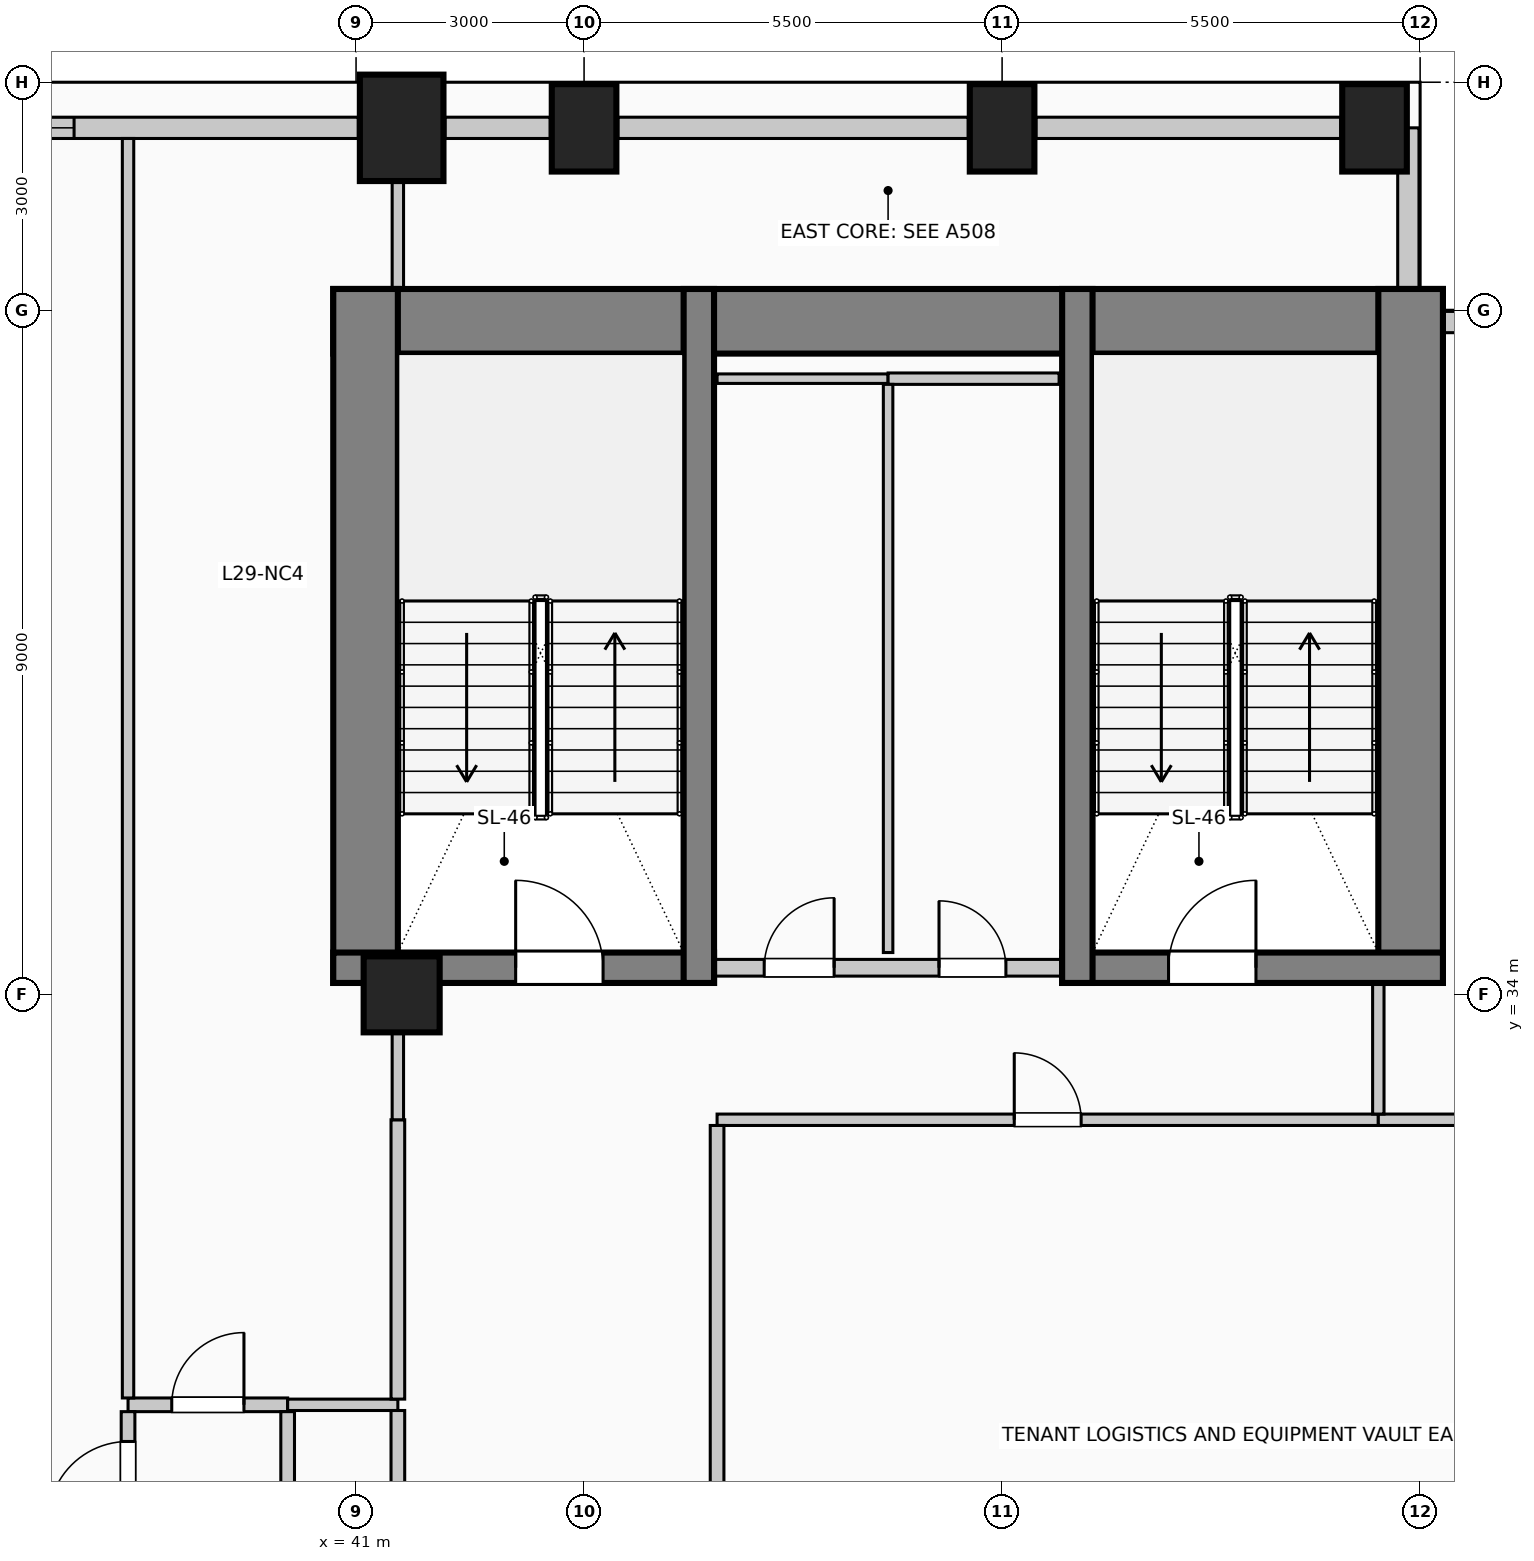
"""IFC4 building model, lengths in metres.
Left out: names, types, materials, properties, quantities, classifications, styles, units other than length and angle.
Written with IfcOpenShell. Run it as: python <this file> out.ifc"""

import sys

from ifc_helpers import new_model, si_unit, direction, frame, frame_2d, origin, origin_2d, place, context, subcontext, project, spatial, rectangle, circle, extrude, element, fill, save


model = new_model("IFC4")
c1 = context("Model", 3, precision=1e-05, world=origin(), true_north=direction((0.0, 1.0)))
c2 = subcontext(c1, "Body", "Model", "MODEL_VIEW")
j1 = project(units=[si_unit("LENGTHUNIT", "METRE"), si_unit("PLANEANGLEUNIT", "RADIAN")], contexts=[c1])
p1 = place(None, origin())
s1 = spatial("IfcSite", under=j1, at=p1, CompositionType="ELEMENT")
p2 = place(p1, origin())
s2 = spatial("IfcBuilding", under=s1, at=p2, CompositionType="ELEMENT")
p3 = place(p2, frame((0.0, 0.0, 120.6)))
s3 = spatial("IfcBuildingStorey", under=s2, at=p3, CompositionType="ELEMENT", Elevation=120.6)
p4 = place(p3, frame((40.7, 42.855, 0.0), z_axis=(0.0, 0.0, 1.0), x_axis=(1.0, 0.0, 0.0)))
e1 = element("IfcWall", 1, at=p4, inside=s3, PredefinedType="SHEAR", context=c2, shape_type="SweptSolid", body=[
    extrude(rectangle(XDim=14.6, YDim=0.85, at=frame_2d((7.3, 0.0))), origin(), (0.0, 0.0, 1.0), 4.0),
])
for number, where, z_axis, x_axis in (
    (2, (41.125, 34.15, 0.0), (0.0, 0.0, 1.0), (0.0, 1.0, 0.0)),
    (3, (54.875, 34.15, 0.0), (0.0, 0.0, 1.0), (0.0, 1.0, 0.0)),
):
    element("IfcWall", number, at=place(p3, frame(where, z_axis=z_axis, x_axis=x_axis)), inside=s3, PredefinedType="SHEAR", context=c2, shape_type="SweptSolid", body=[
        extrude(rectangle(XDim=9.13, YDim=0.85, at=frame_2d((4.565, 0.0))), origin(), (0.0, 0.0, 1.0), 4.0),
    ])
p5 = place(p3, frame((40.7, 34.35, 0.0), z_axis=(0.0, 0.0, 1.0), x_axis=(1.0, 0.0, 0.0)))
e4 = element("IfcWall", 4, at=p5, inside=s3, PredefinedType="SHEAR", context=c2, shape_type="SweptSolid", body=[
    extrude(rectangle(XDim=5.01, YDim=0.4, at=frame_2d((2.505, 0.0))), origin(), (0.0, 0.0, 1.0), 4.0),
])
p6 = place(p5, frame((2.4, 0.0, 0.0)))
e5 = element("IfcOpeningElement", 5, at=p6, cuts=e4, PredefinedType="OPENING", context=c2, shape_type="SweptSolid", body=[
    extrude(rectangle(XDim=1.15, YDim=2.2, at=frame_2d((0.575, 1.1))), frame((0.0, 0.21, 0.0), z_axis=(0.0, -1.0, 0.0), x_axis=(1.0, 0.0, 0.0)), (0.0, 0.0, 1.0), 0.42),
])
p7 = place(p3, frame((45.51, 34.15, 0.0), z_axis=(0.0, 0.0, 1.0), x_axis=(0.0, 1.0, 0.0)))
e6 = element("IfcWall", 6, at=p7, inside=s3, PredefinedType="SHEAR", context=c2, shape_type="SweptSolid", body=[
    extrude(rectangle(XDim=9.13, YDim=0.4, at=frame_2d((4.565, 0.0))), origin(), (0.0, 0.0, 1.0), 4.0),
])
p8 = place(p3, frame((50.29, 34.35, 0.0), z_axis=(0.0, 0.0, 1.0), x_axis=(1.0, 0.0, 0.0)))
e7 = element("IfcWall", 7, at=p8, inside=s3, PredefinedType="SHEAR", context=c2, shape_type="SweptSolid", body=[
    extrude(rectangle(XDim=5.01, YDim=0.4, at=frame_2d((2.505, 0.0))), origin(), (0.0, 0.0, 1.0), 4.0),
])
p9 = place(p8, frame((1.4, 0.0, 0.0)))
e8 = element("IfcOpeningElement", 8, at=p9, cuts=e7, PredefinedType="OPENING", context=c2, shape_type="SweptSolid", body=[
    extrude(rectangle(XDim=1.15, YDim=2.2, at=frame_2d((0.575, 1.1))), frame((0.0, 0.21, 0.0), z_axis=(0.0, -1.0, 0.0), x_axis=(1.0, 0.0, 0.0)), (0.0, 0.0, 1.0), 0.42),
])
p10 = place(p3, frame((50.49, 34.15, 0.0), z_axis=(0.0, 0.0, 1.0), x_axis=(0.0, 1.0, 0.0)))
e9 = element("IfcWall", 9, at=p10, inside=s3, PredefinedType="SHEAR", context=c2, shape_type="SweptSolid", body=[
    extrude(rectangle(XDim=9.13, YDim=0.4, at=frame_2d((4.565, 0.0))), origin(), (0.0, 0.0, 1.0), 4.0),
])
p11 = place(p3, frame((41.6, 45.4, 0.0), z_axis=(0.0, 0.0, 1.0), x_axis=(1.0, 0.0, 0.0)))
e10 = element("IfcColumn", 10, at=p11, inside=s3, PredefinedType="COLUMN", context=c2, shape_type="SweptSolid", body=[
    extrude(rectangle(XDim=1.1, YDim=1.4, at=origin_2d()), origin(), (0.0, 0.0, 1.0), 4.0),
])
for number, where, z_axis, x_axis in (
    (11, (44.0, 45.4, 0.0), (0.0, 0.0, 1.0), (1.0, 0.0, 0.0)),
    (12, (49.5, 45.4, 0.0), (0.0, 0.0, 1.0), (1.0, 0.0, 0.0)),
    (13, (54.4, 45.4, 0.0), (0.0, 0.0, 1.0), (1.0, 0.0, 0.0)),
):
    element("IfcColumn", number, at=place(p3, frame(where, z_axis=z_axis, x_axis=x_axis)), inside=s3, PredefinedType="COLUMN", context=c2, shape_type="SweptSolid", body=[
        extrude(rectangle(XDim=0.85, YDim=1.15, at=origin_2d()), origin(), (0.0, 0.0, 1.0), 4.0),
    ])
p12 = place(p3, frame((41.6, 34.0, 0.0), z_axis=(0.0, 0.0, 1.0), x_axis=(1.0, 0.0, 0.0)))
e14 = element("IfcColumn", 14, at=p12, inside=s3, PredefinedType="COLUMN", context=c2, shape_type="SweptSolid", body=[
    extrude(circle(Radius=0.5, at=origin_2d()), origin(), (0.0, 0.0, 1.0), 4.0),
])
p13 = place(p3, frame((34.57, 45.4, 0.0), z_axis=(0.0, 0.0, 1.0), x_axis=(1.0, 0.0, 0.0)))
e15 = element("IfcWall", 15, at=p13, inside=s3, PredefinedType="SOLIDWALL", context=c2, shape_type="SweptSolid", body=[
    extrude(rectangle(XDim=6.46, YDim=0.28, at=frame_2d((3.23, 0.0))), origin(), (0.0, 0.0, 1.0), 2.875),
])
p14 = place(p13, frame((1.02, 0.0, 0.5)))
e16 = element("IfcOpeningElement", 16, at=p14, cuts=e15, PredefinedType="OPENING", context=c2, shape_type="SweptSolid", body=[
    extrude(rectangle(XDim=1.7, YDim=1.95, at=frame_2d((0.85, 0.975))), frame((0.0, 0.15, 0.0), z_axis=(0.0, -1.0, 0.0), x_axis=(1.0, 0.0, 0.0)), (0.0, 0.0, 1.0), 0.3),
])
p15 = place(p3, frame((42.17, 45.4, 0.0), z_axis=(0.0, 0.0, 1.0), x_axis=(1.0, 0.0, 0.0)))
e17 = element("IfcWall", 17, at=p15, inside=s3, PredefinedType="SOLIDWALL", context=c2, shape_type="SweptSolid", body=[
    extrude(rectangle(XDim=1.385, YDim=0.28, at=frame_2d((0.692, 0.0))), origin(), (0.0, 0.0, 1.0), 2.875),
])
p16 = place(p3, frame((44.445, 45.4, 0.0), z_axis=(0.0, 0.0, 1.0), x_axis=(1.0, 0.0, 0.0)))
e18 = element("IfcWall", 18, at=p16, inside=s3, PredefinedType="SOLIDWALL", context=c2, shape_type="SweptSolid", body=[
    extrude(rectangle(XDim=4.61, YDim=0.28, at=frame_2d((2.305, 0.0))), origin(), (0.0, 0.0, 1.0), 2.875),
])
p17 = place(p3, frame((49.945, 45.4, 0.0), z_axis=(0.0, 0.0, 1.0), x_axis=(1.0, 0.0, 0.0)))
e19 = element("IfcWall", 19, at=p17, inside=s3, PredefinedType="SOLIDWALL", context=c2, shape_type="SweptSolid", body=[
    extrude(rectangle(XDim=4.01, YDim=0.28, at=frame_2d((2.005, 0.0))), origin(), (0.0, 0.0, 1.0), 2.875),
])
p18 = place(p3, frame((54.845, 45.4, 0.0), z_axis=(0.0, 0.0, 1.0), x_axis=(0.0, -1.0, 0.0)))
e20 = element("IfcWall", 20, at=p18, inside=s3, PredefinedType="SOLIDWALL", context=c2, shape_type="SweptSolid", body=[
    extrude(rectangle(XDim=2.115, YDim=0.28, at=frame_2d((1.058, 0.0))), origin(), (0.0, 0.0, 1.0), 3.725),
])
p19 = place(p3, frame((55.305, 42.845, 0.0), z_axis=(0.0, 0.0, 1.0), x_axis=(1.0, 0.0, 0.0)))
e21 = element("IfcWall", 21, at=p19, inside=s3, PredefinedType="SOLIDWALL", context=c2, shape_type="SweptSolid", body=[
    extrude(rectangle(XDim=2.095, YDim=0.28, at=frame_2d((1.047, 0.0))), origin(), (0.0, 0.0, 1.0), 3.725),
])
p20 = place(p3, frame((45.72, 34.35, 0.0), z_axis=(0.0, 0.0, 1.0), x_axis=(1.0, 0.0, 0.0)))
e22 = element("IfcWall", 22, at=p20, inside=s3, PredefinedType="PARTITIONING", context=c2, shape_type="SweptSolid", body=[
    extrude(rectangle(XDim=4.56, YDim=0.22, at=frame_2d((2.28, 0.0))), origin(), (0.0, 0.0, 1.0), 3.725),
])
p21 = place(p20, frame((0.65, 0.0, 0.0)))
e23 = element("IfcOpeningElement", 23, at=p21, cuts=e22, PredefinedType="OPENING", context=c2, shape_type="SweptSolid", body=[
    extrude(rectangle(XDim=0.92, YDim=2.1, at=frame_2d((0.46, 1.05))), frame((0.0, 0.12, 0.0), z_axis=(0.0, -1.0, 0.0), x_axis=(1.0, 0.0, 0.0)), (0.0, 0.0, 1.0), 0.24),
])
p22 = place(p20, frame((2.95, 0.0, 0.0)))
e24 = element("IfcOpeningElement", 24, at=p22, cuts=e22, PredefinedType="OPENING", context=c2, shape_type="SweptSolid", body=[
    extrude(rectangle(XDim=0.88, YDim=2.1, at=frame_2d((0.44, 1.05))), frame((0.0, 0.12, 0.0), z_axis=(0.0, -1.0, 0.0), x_axis=(1.0, 0.0, 0.0)), (0.0, 0.0, 1.0), 0.24),
])
p23 = place(p3, frame((38.0, 28.6, 0.0), z_axis=(0.0, 0.0, 1.0), x_axis=(1.0, 0.0, 0.0)))
e25 = element("IfcWall", 25, at=p23, inside=s3, PredefinedType="PARTITIONING", context=c2, shape_type="SweptSolid", body=[
    extrude(rectangle(XDim=2.1, YDim=0.18, at=frame_2d((1.05, 0.0))), origin(), (0.0, 0.0, 1.0), 3.725),
])
p24 = place(p23, frame((0.575, 0.0, 0.0)))
e26 = element("IfcOpeningElement", 26, at=p24, cuts=e25, PredefinedType="OPENING", context=c2, shape_type="SweptSolid", body=[
    extrude(rectangle(XDim=0.95, YDim=2.15, at=frame_2d((0.475, 1.075))), frame((0.0, 0.1, 0.0), z_axis=(0.0, -1.0, 0.0), x_axis=(1.0, 0.0, 0.0)), (0.0, 0.0, 1.0), 0.2),
])
p25 = place(p3, frame((40.1, 28.6, 0.0), z_axis=(0.0, 0.0, 1.0), x_axis=(1.0, 0.0, 0.0)))
e27 = element("IfcWall", 27, at=p25, inside=s3, PredefinedType="PARTITIONING", context=c2, shape_type="SweptSolid", body=[
    extrude(rectangle(XDim=1.45, YDim=0.15, at=frame_2d((0.725, 0.0))), origin(), (0.0, 0.0, 1.0), 3.725),
])
p26 = place(p3, frame((45.75, 32.35, 0.0), z_axis=(0.0, 0.0, 1.0), x_axis=(1.0, 0.0, 0.0)))
e28 = element("IfcWall", 28, at=p26, inside=s3, PredefinedType="PARTITIONING", context=c2, shape_type="SweptSolid", body=[
    extrude(rectangle(XDim=8.7, YDim=0.15, at=frame_2d((4.35, 0.0))), origin(), (0.0, 0.0, 1.0), 3.725),
])
p27 = place(p26, frame((3.91, 0.0, 0.0)))
e29 = element("IfcOpeningElement", 29, at=p27, cuts=e28, PredefinedType="OPENING", context=c2, shape_type="SweptSolid", body=[
    extrude(rectangle(XDim=0.88, YDim=2.1, at=frame_2d((0.44, 1.05))), frame((0.0, 0.085, 0.0), z_axis=(0.0, -1.0, 0.0), x_axis=(1.0, 0.0, 0.0)), (0.0, 0.0, 1.0), 0.17),
])
p28 = place(p3, frame((54.45, 32.35, 0.0), z_axis=(0.0, 0.0, 1.0), x_axis=(1.0, 0.0, 0.0)))
e30 = element("IfcWall", 30, at=p28, inside=s3, PredefinedType="PARTITIONING", context=c2, shape_type="SweptSolid", body=[
    extrude(rectangle(XDim=2.81, YDim=0.15, at=frame_2d((1.405, 0.0))), origin(), (0.0, 0.0, 1.0), 3.725),
])
p29 = place(p3, frame((45.75, 42.1, 0.0), z_axis=(0.0, 0.0, 1.0), x_axis=(1.0, 0.0, 0.0)))
e31 = element("IfcWall", 31, at=p29, inside=s3, PredefinedType="PARTITIONING", context=c2, shape_type="SweptSolid", body=[
    extrude(rectangle(XDim=2.25, YDim=0.125, at=frame_2d((1.125, 0.0))), origin(), (0.0, 0.0, 1.0), 3.725),
])
p30 = place(p3, frame((48.0, 42.1, 0.0), z_axis=(0.0, 0.0, 1.0), x_axis=(1.0, 0.0, 0.0)))
e32 = element("IfcWall", 32, at=p30, inside=s3, PredefinedType="PARTITIONING", context=c2, shape_type="SweptSolid", body=[
    extrude(rectangle(XDim=2.25, YDim=0.15, at=frame_2d((1.125, 0.0))), origin(), (0.0, 0.0, 1.0), 3.725),
])
p31 = place(p3, frame((38.0, 26.675, 0.0), z_axis=(0.0, 0.0, 1.0), x_axis=(0.0, 1.0, 0.0)))
e33 = element("IfcWall", 33, at=p31, inside=s3, PredefinedType="PARTITIONING", context=c2, shape_type="SweptSolid", body=[
    extrude(rectangle(XDim=1.835, YDim=0.18, at=frame_2d((0.917, 0.0))), origin(), (0.0, 0.0, 1.0), 3.725),
])
p32 = place(p31, frame((0.393, 0.0, 0.0)))
e34 = element("IfcOpeningElement", 34, at=p32, cuts=e33, PredefinedType="OPENING", context=c2, shape_type="SweptSolid", body=[
    extrude(rectangle(XDim=1.05, YDim=2.15, at=frame_2d((0.525, 1.075))), frame((0.0, 0.1, 0.0), z_axis=(0.0, -1.0, 0.0), x_axis=(1.0, 0.0, 0.0)), (0.0, 0.0, 1.0), 0.2),
])
p33 = place(p3, frame((38.0, 28.69, 0.0), z_axis=(0.0, 0.0, 1.0), x_axis=(0.0, 1.0, 0.0)))
e35 = element("IfcWall", 35, at=p33, inside=s3, PredefinedType="PARTITIONING", context=c2, shape_type="SweptSolid", body=[
    extrude(rectangle(XDim=16.57, YDim=0.15, at=frame_2d((8.285, 0.0))), origin(), (0.0, 0.0, 1.0), 3.725),
])
p34 = place(p3, frame((40.1, 15.74, 0.0), z_axis=(0.0, 0.0, 1.0), x_axis=(0.0, 1.0, 0.0)))
e36 = element("IfcWall", 36, at=p34, inside=s3, PredefinedType="PARTITIONING", context=c2, shape_type="SweptSolid", body=[
    extrude(rectangle(XDim=12.77, YDim=0.18, at=frame_2d((6.385, 0.0))), origin(), (0.0, 0.0, 1.0), 3.725),
])
p35 = place(p3, frame((41.55, 18.5, 0.0), z_axis=(0.0, 0.0, 1.0), x_axis=(0.0, 1.0, 0.0)))
e37 = element("IfcWall", 37, at=p35, inside=s3, PredefinedType="PARTITIONING", context=c2, shape_type="SweptSolid", body=[
    extrude(rectangle(XDim=10.025, YDim=0.18, at=frame_2d((5.012, 0.0))), origin(), (0.0, 0.0, 1.0), 3.07),
])
p36 = place(p3, frame((41.55, 28.675, 0.0), z_axis=(0.0, 0.0, 1.0), x_axis=(0.0, 1.0, 0.0)))
e38 = element("IfcWall", 38, at=p36, inside=s3, PredefinedType="PARTITIONING", context=c2, shape_type="SweptSolid", body=[
    extrude(rectangle(XDim=3.675, YDim=0.18, at=frame_2d((1.837, 0.0))), origin(), (0.0, 0.0, 1.0), 3.07),
])
p37 = place(p3, frame((41.55, 32.35, 0.0), z_axis=(0.0, 0.0, 1.0), x_axis=(0.0, 1.0, 0.0)))
e39 = element("IfcWall", 39, at=p37, inside=s3, PredefinedType="PARTITIONING", context=c2, shape_type="SweptSolid", body=[
    extrude(rectangle(XDim=1.15, YDim=0.15, at=frame_2d((0.575, 0.0))), origin(), (0.0, 0.0, 1.0), 3.07),
])
p38 = place(p3, frame((41.55, 43.28, 0.0), z_axis=(0.0, 0.0, 1.0), x_axis=(0.0, 1.0, 0.0)))
e40 = element("IfcWall", 40, at=p38, inside=s3, PredefinedType="PARTITIONING", context=c2, shape_type="SweptSolid", body=[
    extrude(rectangle(XDim=1.42, YDim=0.15, at=frame_2d((0.71, 0.0))), origin(), (0.0, 0.0, 1.0), 3.725),
])
p39 = place(p3, frame((45.75, 24.075, 0.0), z_axis=(0.0, 0.0, 1.0), x_axis=(0.0, 1.0, 0.0)))
e41 = element("IfcWall", 41, at=p39, inside=s3, PredefinedType="PARTITIONING", context=c2, shape_type="SweptSolid", body=[
    extrude(rectangle(XDim=8.2, YDim=0.18, at=frame_2d((4.1, 0.0))), origin(), (0.0, 0.0, 1.0), 3.725),
])
p40 = place(p3, frame((48.0, 34.55, 0.0), z_axis=(0.0, 0.0, 1.0), x_axis=(0.0, 1.0, 0.0)))
e42 = element("IfcWall", 42, at=p40, inside=s3, PredefinedType="PARTITIONING", context=c2, shape_type="SweptSolid", body=[
    extrude(rectangle(XDim=7.475, YDim=0.125, at=frame_2d((3.737, 0.0))), origin(), (0.0, 0.0, 1.0), 3.725),
])
p41 = place(p3, frame((54.45, 32.425, 0.0), z_axis=(0.0, 0.0, 1.0), x_axis=(0.0, 1.0, 0.0)))
e43 = element("IfcWall", 43, at=p41, inside=s3, PredefinedType="PARTITIONING", context=c2, shape_type="SweptSolid", body=[
    extrude(rectangle(XDim=1.725, YDim=0.15, at=frame_2d((0.862, 0.0))), origin(), (0.0, 0.0, 1.0), 3.725),
])
p42 = place(p14, origin())
e44 = element("IfcWindow", 44, at=p42, inside=s3, PartitioningType="SINGLE_PANEL", PredefinedType="WINDOW", context=c2, shape_type="SweptSolid", body=[
    extrude(rectangle(XDim=1.7, YDim=1.95, at=frame_2d((0.85, 0.975))), frame((0.0, 0.03, 0.0), z_axis=(0.0, -1.0, 0.0), x_axis=(1.0, 0.0, 0.0)), (0.0, 0.0, 1.0), 0.06),
])
fill(e16, e44)
p43 = place(p6, origin())
e45 = element("IfcDoor", 45, at=p43, inside=s3, OperationType="SINGLE_SWING_LEFT", PredefinedType="DOOR", context=c2, shape_type="SweptSolid", body=[
    extrude(rectangle(XDim=1.15, YDim=2.2, at=frame_2d((0.575, 1.1))), frame((0.0, 0.025, 0.0), z_axis=(0.0, -1.0, 0.0), x_axis=(1.0, 0.0, 0.0)), (0.0, 0.0, 1.0), 0.05),
])
fill(e5, e45)
p44 = place(p21, origin())
e46 = element("IfcDoor", 46, at=p44, inside=s3, OperationType="SINGLE_SWING_RIGHT", PredefinedType="DOOR", context=c2, shape_type="SweptSolid", body=[
    extrude(rectangle(XDim=0.92, YDim=2.1, at=frame_2d((0.46, 1.05))), frame((0.0, 0.025, 0.0), z_axis=(0.0, -1.0, 0.0), x_axis=(1.0, 0.0, 0.0)), (0.0, 0.0, 1.0), 0.05),
])
fill(e23, e46)
p45 = place(p22, origin())
e47 = element("IfcDoor", 47, at=p45, inside=s3, OperationType="SINGLE_SWING_LEFT", PredefinedType="DOOR", context=c2, shape_type="SweptSolid", body=[
    extrude(rectangle(XDim=0.88, YDim=2.1, at=frame_2d((0.44, 1.05))), frame((0.0, 0.025, 0.0), z_axis=(0.0, -1.0, 0.0), x_axis=(1.0, 0.0, 0.0)), (0.0, 0.0, 1.0), 0.05),
])
fill(e24, e47)
p46 = place(p9, origin())
e48 = element("IfcDoor", 48, at=p46, inside=s3, OperationType="SINGLE_SWING_RIGHT", PredefinedType="DOOR", context=c2, shape_type="SweptSolid", body=[
    extrude(rectangle(XDim=1.15, YDim=2.2, at=frame_2d((0.575, 1.1))), frame((0.0, 0.025, 0.0), z_axis=(0.0, -1.0, 0.0), x_axis=(1.0, 0.0, 0.0)), (0.0, 0.0, 1.0), 0.05),
])
fill(e8, e48)
p47 = place(p24, origin())
e49 = element("IfcDoor", 49, at=p47, inside=s3, OperationType="SINGLE_SWING_RIGHT", PredefinedType="DOOR", context=c2, shape_type="SweptSolid", body=[
    extrude(rectangle(XDim=0.95, YDim=2.15, at=frame_2d((0.475, 1.075))), frame((0.0, 0.025, 0.0), z_axis=(0.0, -1.0, 0.0), x_axis=(1.0, 0.0, 0.0)), (0.0, 0.0, 1.0), 0.05),
])
fill(e26, e49)
p48 = place(p27, origin())
e50 = element("IfcDoor", 50, at=p48, inside=s3, OperationType="SINGLE_SWING_LEFT", PredefinedType="DOOR", context=c2, shape_type="SweptSolid", body=[
    extrude(rectangle(XDim=0.88, YDim=2.1, at=frame_2d((0.44, 1.05))), frame((0.0, 0.025, 0.0), z_axis=(0.0, -1.0, 0.0), x_axis=(1.0, 0.0, 0.0)), (0.0, 0.0, 1.0), 0.05),
])
fill(e29, e50)
p49 = place(p32, origin())
e51 = element("IfcDoor", 51, at=p49, inside=s3, OperationType="SINGLE_SWING_LEFT", PredefinedType="DOOR", context=c2, shape_type="SweptSolid", body=[
    extrude(rectangle(XDim=1.05, YDim=2.15, at=frame_2d((0.525, 1.075))), frame((0.0, 0.025, 0.0), z_axis=(0.0, -1.0, 0.0), x_axis=(1.0, 0.0, 0.0)), (0.0, 0.0, 1.0), 0.05),
])
fill(e34, e51)
save(model, sys.argv[1])
